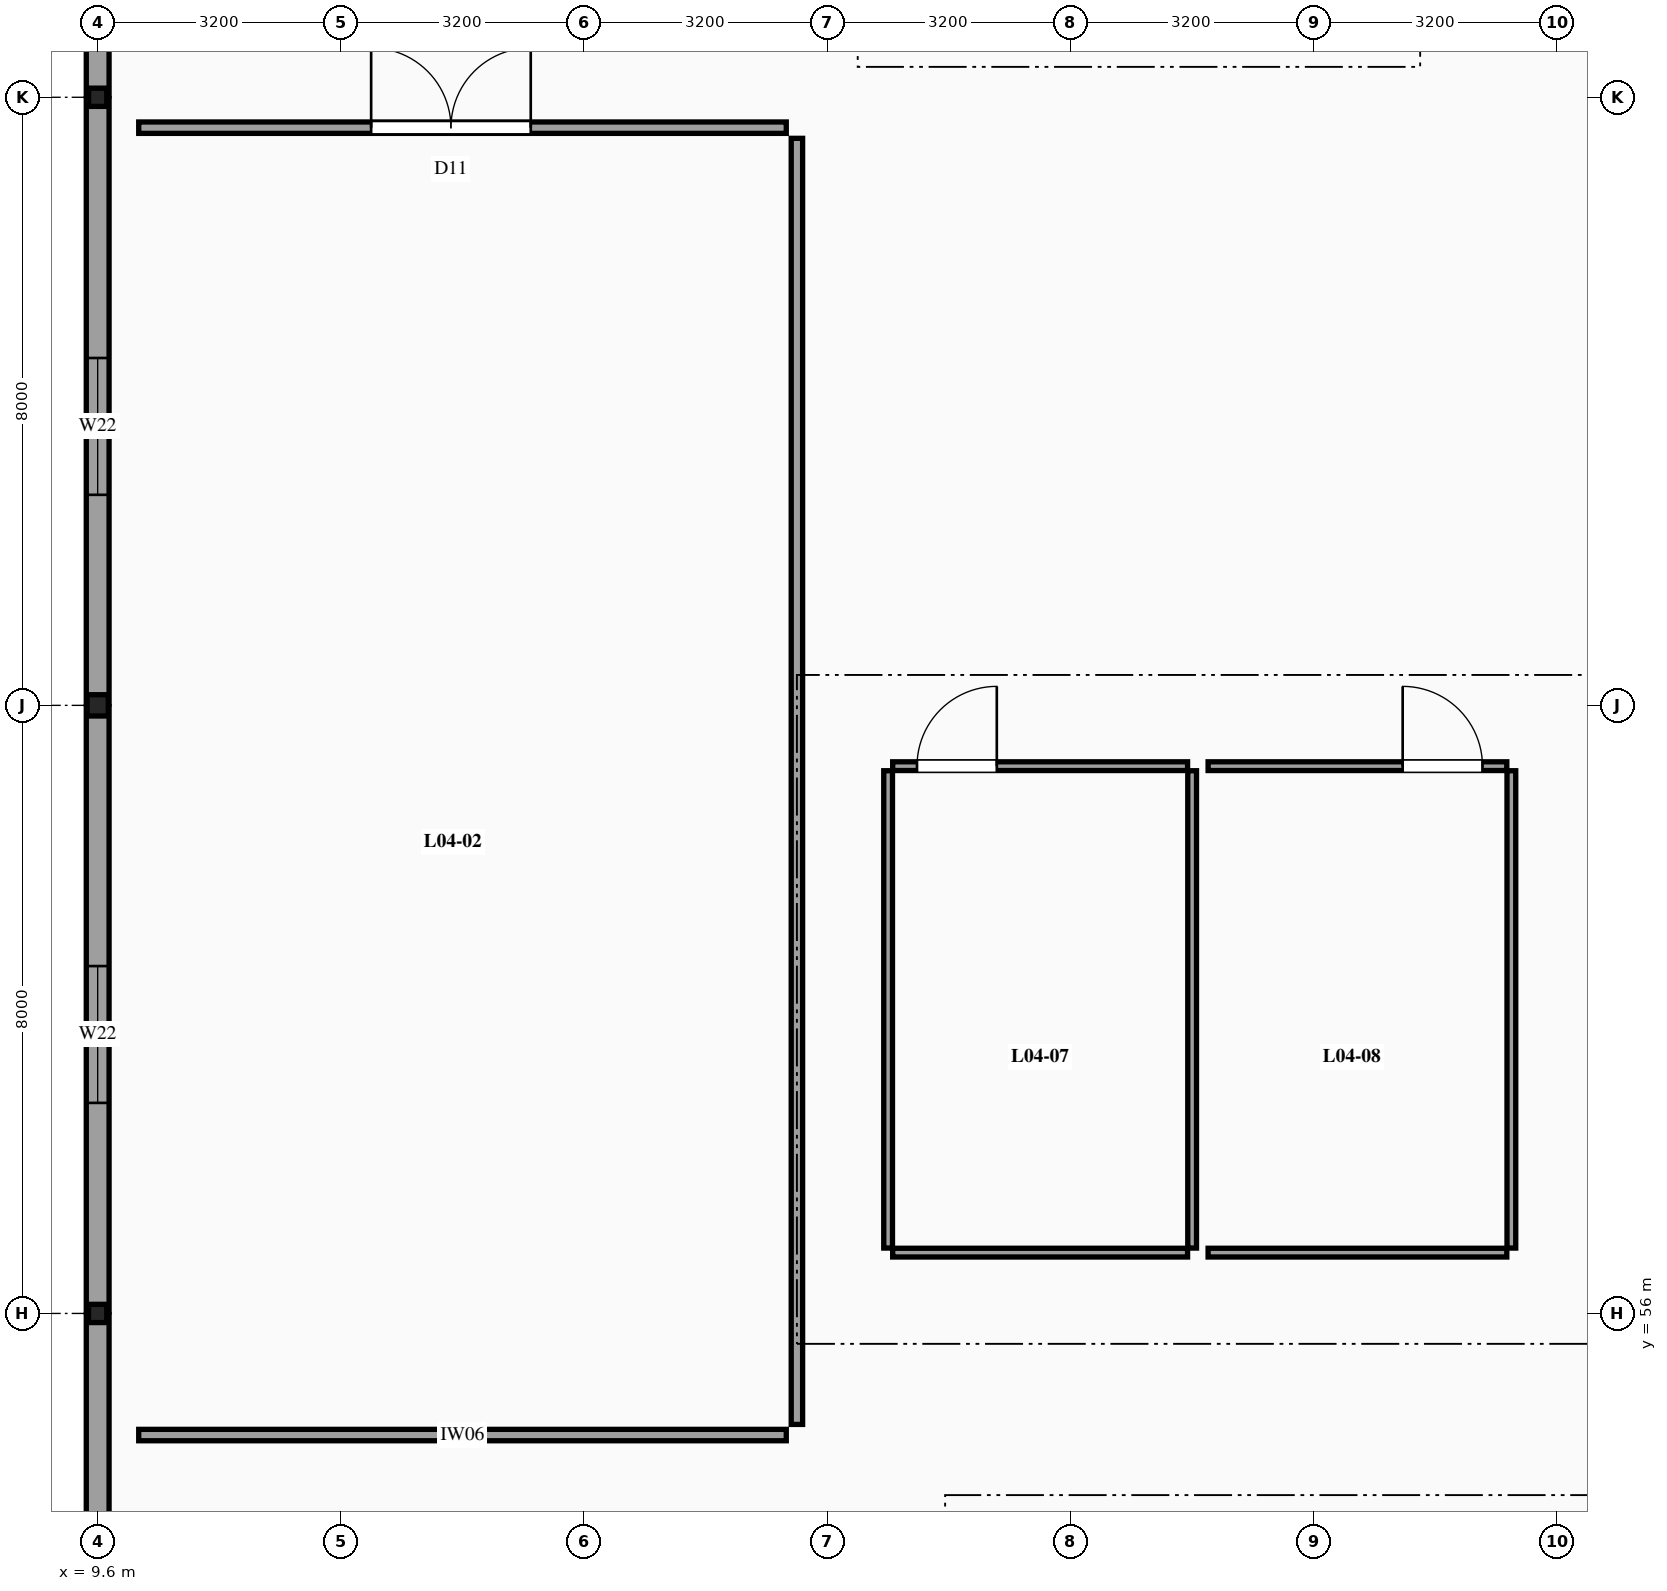
"""IFC4 building model, lengths in metres.
Left out: names, types, materials, properties, quantities, classifications, styles, units other than length and angle.
Written with IfcOpenShell. Run it as: python <this file> out.ifc"""

import sys

from ifc_helpers import new_model, si_unit, direction, frame, frame_2d, origin, origin_2d, place, context, subcontext, project, spatial, rectangle, i_section, extrude, element, fill, save


model = new_model("IFC4")
c1 = context("Model", 3, precision=1e-05, world=origin(), true_north=direction((0.0, 1.0)))
c2 = subcontext(c1, "Body", "Model", "MODEL_VIEW")
j1 = project(units=[si_unit("LENGTHUNIT", "METRE"), si_unit("PLANEANGLEUNIT", "RADIAN")], contexts=[c1])
p1 = place(None, origin())
s1 = spatial("IfcSite", under=j1, at=p1, CompositionType="ELEMENT")
p2 = place(p1, origin())
s2 = spatial("IfcBuilding", under=s1, at=p2, CompositionType="ELEMENT")
p3 = place(p2, frame((0.0, 0.0, 17.4)))
s3 = spatial("IfcBuildingStorey", under=s2, at=p3, CompositionType="ELEMENT", Elevation=17.4)
p4 = place(p3, frame((9.6, 56.0, -0.28), z_axis=(0.0, 0.0, 1.0), x_axis=(1.0, 0.0, 0.0)))
e1 = element("IfcColumn", 1, at=p4, inside=s3, PredefinedType="COLUMN", context=c2, shape_type="SweptSolid", body=[
    extrude(i_section(OverallWidth=0.24, OverallDepth=0.24, WebThickness=0.01, FlangeThickness=0.017, FilletRadius=0.021, at=origin_2d()), origin(), (0.0, 0.0, 1.0), 8.42),
])
p5 = place(p3, frame((9.6, 64.0, -0.28), z_axis=(0.0, 0.0, 1.0), x_axis=(1.0, 0.0, 0.0)))
e2 = element("IfcColumn", 2, at=p5, inside=s3, PredefinedType="COLUMN", context=c2, shape_type="SweptSolid", body=[
    extrude(i_section(OverallWidth=0.28, OverallDepth=0.28, WebThickness=0.01, FlangeThickness=0.018, FilletRadius=0.024, at=origin_2d()), origin(), (0.0, 0.0, 1.0), 8.42),
])
p6 = place(p3, frame((9.6, 72.0, -0.28), z_axis=(0.0, 0.0, 1.0), x_axis=(1.0, 0.0, 0.0)))
e3 = element("IfcColumn", 3, at=p6, inside=s3, PredefinedType="COLUMN", context=c2, shape_type="SweptSolid", body=[
    extrude(i_section(OverallWidth=0.24, OverallDepth=0.24, WebThickness=0.01, FlangeThickness=0.017, FilletRadius=0.021, at=origin_2d()), origin(), (0.0, 0.0, 1.0), 8.42),
])
p7 = place(p3, frame((9.6, 48.02, 0.0), z_axis=(0.0, 0.0, 1.0), x_axis=(0.0, 1.0, 0.0)))
e4 = element("IfcWall", 4, at=p7, inside=s3, PredefinedType="SOLIDWALL", context=c2, shape_type="SweptSolid", body=[
    extrude(rectangle(XDim=7.96, YDim=0.3, at=frame_2d((3.98, 0.0))), origin(), (0.0, 0.0, 1.0), 7.46),
])
p8 = place(p7, frame((2.75, 0.0, 0.85)))
e5 = element("IfcOpeningElement", 5, at=p8, cuts=e4, PredefinedType="OPENING", context=c2, shape_type="SweptSolid", body=[
    extrude(rectangle(XDim=1.8, YDim=3.6, at=frame_2d((0.9, 1.8))), frame((0.0, 0.16, 0.0), z_axis=(0.0, -1.0, 0.0), x_axis=(1.0, 0.0, 0.0)), (0.0, 0.0, 1.0), 0.32),
])
p9 = place(p3, frame((9.6, 56.02, 0.0), z_axis=(0.0, 0.0, 1.0), x_axis=(0.0, 1.0, 0.0)))
e6 = element("IfcWall", 6, at=p9, inside=s3, PredefinedType="SOLIDWALL", context=c2, shape_type="SweptSolid", body=[
    extrude(rectangle(XDim=7.96, YDim=0.3, at=frame_2d((3.98, 0.0))), origin(), (0.0, 0.0, 1.0), 7.46),
])
p10 = place(p9, frame((2.75, 0.0, 0.85)))
e7 = element("IfcOpeningElement", 7, at=p10, cuts=e6, PredefinedType="OPENING", context=c2, shape_type="SweptSolid", body=[
    extrude(rectangle(XDim=1.8, YDim=3.6, at=frame_2d((0.9, 1.8))), frame((0.0, 0.16, 0.0), z_axis=(0.0, -1.0, 0.0), x_axis=(1.0, 0.0, 0.0)), (0.0, 0.0, 1.0), 0.32),
])
p11 = place(p3, frame((9.6, 64.02, 0.0), z_axis=(0.0, 0.0, 1.0), x_axis=(0.0, 1.0, 0.0)))
e8 = element("IfcWall", 8, at=p11, inside=s3, PredefinedType="SOLIDWALL", context=c2, shape_type="SweptSolid", body=[
    extrude(rectangle(XDim=7.96, YDim=0.3, at=frame_2d((3.98, 0.0))), origin(), (0.0, 0.0, 1.0), 7.46),
])
p12 = place(p11, frame((2.75, 0.0, 0.85)))
e9 = element("IfcOpeningElement", 9, at=p12, cuts=e8, PredefinedType="OPENING", context=c2, shape_type="SweptSolid", body=[
    extrude(rectangle(XDim=1.8, YDim=3.6, at=frame_2d((0.9, 1.8))), frame((0.0, 0.16, 0.0), z_axis=(0.0, -1.0, 0.0), x_axis=(1.0, 0.0, 0.0)), (0.0, 0.0, 1.0), 0.32),
])
p13 = place(p3, frame((9.6, 72.02, 0.0), z_axis=(0.0, 0.0, 1.0), x_axis=(0.0, 1.0, 0.0)))
e10 = element("IfcWall", 10, at=p13, inside=s3, PredefinedType="SOLIDWALL", context=c2, shape_type="SweptSolid", body=[
    extrude(rectangle(XDim=7.96, YDim=0.3, at=frame_2d((3.98, 0.0))), origin(), (0.0, 0.0, 1.0), 7.46),
])
p14 = place(p13, frame((2.75, 0.0, 0.85)))
e11 = element("IfcOpeningElement", 11, at=p14, cuts=e10, PredefinedType="OPENING", context=c2, shape_type="SweptSolid", body=[
    extrude(rectangle(XDim=1.8, YDim=3.6, at=frame_2d((0.9, 1.8))), frame((0.0, 0.16, 0.0), z_axis=(0.0, -1.0, 0.0), x_axis=(1.0, 0.0, 0.0)), (0.0, 0.0, 1.0), 0.32),
])
p15 = place(p3, frame((10.14, 71.6, 0.0), z_axis=(0.0, 0.0, 1.0), x_axis=(1.0, 0.0, 0.0)))
e12 = element("IfcWall", 12, at=p15, inside=s3, PredefinedType="PARTITIONING", context=c2, shape_type="SweptSolid", body=[
    extrude(rectangle(XDim=8.52, YDim=0.15, at=frame_2d((4.26, 0.0))), origin(), (0.0, 0.0, 1.0), 7.5),
])
p16 = place(p15, frame((3.058, 0.0, 0.0)))
e13 = element("IfcOpeningElement", 13, at=p16, cuts=e12, PredefinedType="OPENING", context=c2, shape_type="SweptSolid", body=[
    extrude(rectangle(XDim=2.1, YDim=2.65, at=frame_2d((1.05, 1.325))), frame((0.0, 0.085, 0.0), z_axis=(0.0, -1.0, 0.0), x_axis=(1.0, 0.0, 0.0)), (0.0, 0.0, 1.0), 0.17),
])
p17 = place(p3, frame((10.14, 54.4, 0.0), z_axis=(0.0, 0.0, 1.0), x_axis=(1.0, 0.0, 0.0)))
e14 = element("IfcWall", 14, at=p17, inside=s3, PredefinedType="PARTITIONING", context=c2, shape_type="SweptSolid", body=[
    extrude(rectangle(XDim=8.52, YDim=0.15, at=frame_2d((4.26, 0.0))), origin(), (0.0, 0.0, 1.0), 7.5),
])
p18 = place(p3, frame((18.8, 54.54, 0.0), z_axis=(0.0, 0.0, 1.0), x_axis=(0.0, 1.0, 0.0)))
e15 = element("IfcWall", 15, at=p18, inside=s3, PredefinedType="PARTITIONING", context=c2, shape_type="SweptSolid", body=[
    extrude(rectangle(XDim=16.92, YDim=0.15, at=frame_2d((8.46, 0.0))), origin(), (0.0, 0.0, 1.0), 7.5),
])
p19 = place(p3, frame((20.06, 63.2, 0.0), z_axis=(0.0, 0.0, 1.0), x_axis=(1.0, 0.0, 0.0)))
e16 = element("IfcWall", 16, at=p19, inside=s3, PredefinedType="PARTITIONING", context=c2, shape_type="SweptSolid", body=[
    extrude(rectangle(XDim=3.88, YDim=0.115, at=frame_2d((1.94, 0.0))), origin(), (0.0, 0.0, 1.0), 7.5),
])
p20 = place(p19, frame((0.32, 0.0, 0.0)))
e17 = element("IfcOpeningElement", 17, at=p20, cuts=e16, PredefinedType="OPENING", context=c2, shape_type="SweptSolid", body=[
    extrude(rectangle(XDim=1.05, YDim=2.15, at=frame_2d((0.525, 1.075))), frame((0.0, 0.067, 0.0), z_axis=(0.0, -1.0, 0.0), x_axis=(1.0, 0.0, 0.0)), (0.0, 0.0, 1.0), 0.135),
])
p21 = place(p3, frame((20.06, 56.8, 0.0), z_axis=(0.0, 0.0, 1.0), x_axis=(1.0, 0.0, 0.0)))
e18 = element("IfcWall", 18, at=p21, inside=s3, PredefinedType="PARTITIONING", context=c2, shape_type="SweptSolid", body=[
    extrude(rectangle(XDim=3.88, YDim=0.115, at=frame_2d((1.94, 0.0))), origin(), (0.0, 0.0, 1.0), 7.5),
])
for number, where, z_axis, x_axis in (
    (19, (20.0, 56.86, 0.0), (0.0, 0.0, 1.0), (0.0, 1.0, 0.0)),
    (20, (24.0, 56.86, 0.0), (0.0, 0.0, 1.0), (0.0, 1.0, 0.0)),
):
    element("IfcWall", number, at=place(p3, frame(where, z_axis=z_axis, x_axis=x_axis)), inside=s3, PredefinedType="PARTITIONING", context=c2, shape_type="SweptSolid", body=[
        extrude(rectangle(XDim=6.28, YDim=0.115, at=frame_2d((3.14, 0.0))), origin(), (0.0, 0.0, 1.0), 7.5),
    ])
p22 = place(p3, frame((24.21, 63.2, 0.0), z_axis=(0.0, 0.0, 1.0), x_axis=(1.0, 0.0, 0.0)))
e21 = element("IfcWall", 21, at=p22, inside=s3, PredefinedType="PARTITIONING", context=c2, shape_type="SweptSolid", body=[
    extrude(rectangle(XDim=3.93, YDim=0.115, at=frame_2d((1.965, 0.0))), origin(), (0.0, 0.0, 1.0), 7.5),
])
p23 = place(p22, frame((2.56, 0.0, 0.0)))
e22 = element("IfcOpeningElement", 22, at=p23, cuts=e21, PredefinedType="OPENING", context=c2, shape_type="SweptSolid", body=[
    extrude(rectangle(XDim=1.05, YDim=2.15, at=frame_2d((0.525, 1.075))), frame((0.0, 0.067, 0.0), z_axis=(0.0, -1.0, 0.0), x_axis=(1.0, 0.0, 0.0)), (0.0, 0.0, 1.0), 0.135),
])
p24 = place(p3, frame((24.21, 56.8, 0.0), z_axis=(0.0, 0.0, 1.0), x_axis=(1.0, 0.0, 0.0)))
e23 = element("IfcWall", 23, at=p24, inside=s3, PredefinedType="PARTITIONING", context=c2, shape_type="SweptSolid", body=[
    extrude(rectangle(XDim=3.93, YDim=0.115, at=frame_2d((1.965, 0.0))), origin(), (0.0, 0.0, 1.0), 7.5),
])
p25 = place(p3, frame((28.2, 56.86, 0.0), z_axis=(0.0, 0.0, 1.0), x_axis=(0.0, 1.0, 0.0)))
e24 = element("IfcWall", 24, at=p25, inside=s3, PredefinedType="PARTITIONING", context=c2, shape_type="SweptSolid", body=[
    extrude(rectangle(XDim=6.28, YDim=0.115, at=frame_2d((3.14, 0.0))), origin(), (0.0, 0.0, 1.0), 7.5),
])
p26 = place(p10, origin())
e25 = element("IfcWindow", 25, at=p26, inside=s3, PartitioningType="SINGLE_PANEL", PredefinedType="WINDOW", context=c2, shape_type="SweptSolid", body=[
    extrude(rectangle(XDim=1.8, YDim=3.6, at=frame_2d((0.9, 1.8))), frame((0.0, 0.03, 0.0), z_axis=(0.0, -1.0, 0.0), x_axis=(1.0, 0.0, 0.0)), (0.0, 0.0, 1.0), 0.06),
])
fill(e7, e25)
p27 = place(p12, origin())
e26 = element("IfcWindow", 26, at=p27, inside=s3, PartitioningType="SINGLE_PANEL", PredefinedType="WINDOW", context=c2, shape_type="SweptSolid", body=[
    extrude(rectangle(XDim=1.8, YDim=3.6, at=frame_2d((0.9, 1.8))), frame((0.0, 0.03, 0.0), z_axis=(0.0, -1.0, 0.0), x_axis=(1.0, 0.0, 0.0)), (0.0, 0.0, 1.0), 0.06),
])
fill(e9, e26)
p28 = place(p16, origin())
e27 = element("IfcDoor", 27, at=p28, inside=s3, OperationType="DOUBLE_DOOR_SINGLE_SWING", PredefinedType="DOOR", context=c2, shape_type="SweptSolid", body=[
    extrude(rectangle(XDim=2.1, YDim=2.65, at=frame_2d((1.05, 1.325))), frame((0.0, 0.025, 0.0), z_axis=(0.0, -1.0, 0.0), x_axis=(1.0, 0.0, 0.0)), (0.0, 0.0, 1.0), 0.05),
])
fill(e13, e27)
p29 = place(p20, origin())
e28 = element("IfcDoor", 28, at=p29, inside=s3, OperationType="SINGLE_SWING_RIGHT", PredefinedType="DOOR", context=c2, shape_type="SweptSolid", body=[
    extrude(rectangle(XDim=1.05, YDim=2.15, at=frame_2d((0.525, 1.075))), frame((0.0, 0.025, 0.0), z_axis=(0.0, -1.0, 0.0), x_axis=(1.0, 0.0, 0.0)), (0.0, 0.0, 1.0), 0.05),
])
fill(e17, e28)
p30 = place(p23, origin())
e29 = element("IfcDoor", 29, at=p30, inside=s3, OperationType="SINGLE_SWING_LEFT", PredefinedType="DOOR", context=c2, shape_type="SweptSolid", body=[
    extrude(rectangle(XDim=1.05, YDim=2.15, at=frame_2d((0.525, 1.075))), frame((0.0, 0.025, 0.0), z_axis=(0.0, -1.0, 0.0), x_axis=(1.0, 0.0, 0.0)), (0.0, 0.0, 1.0), 0.05),
])
fill(e22, e29)
save(model, sys.argv[1])
